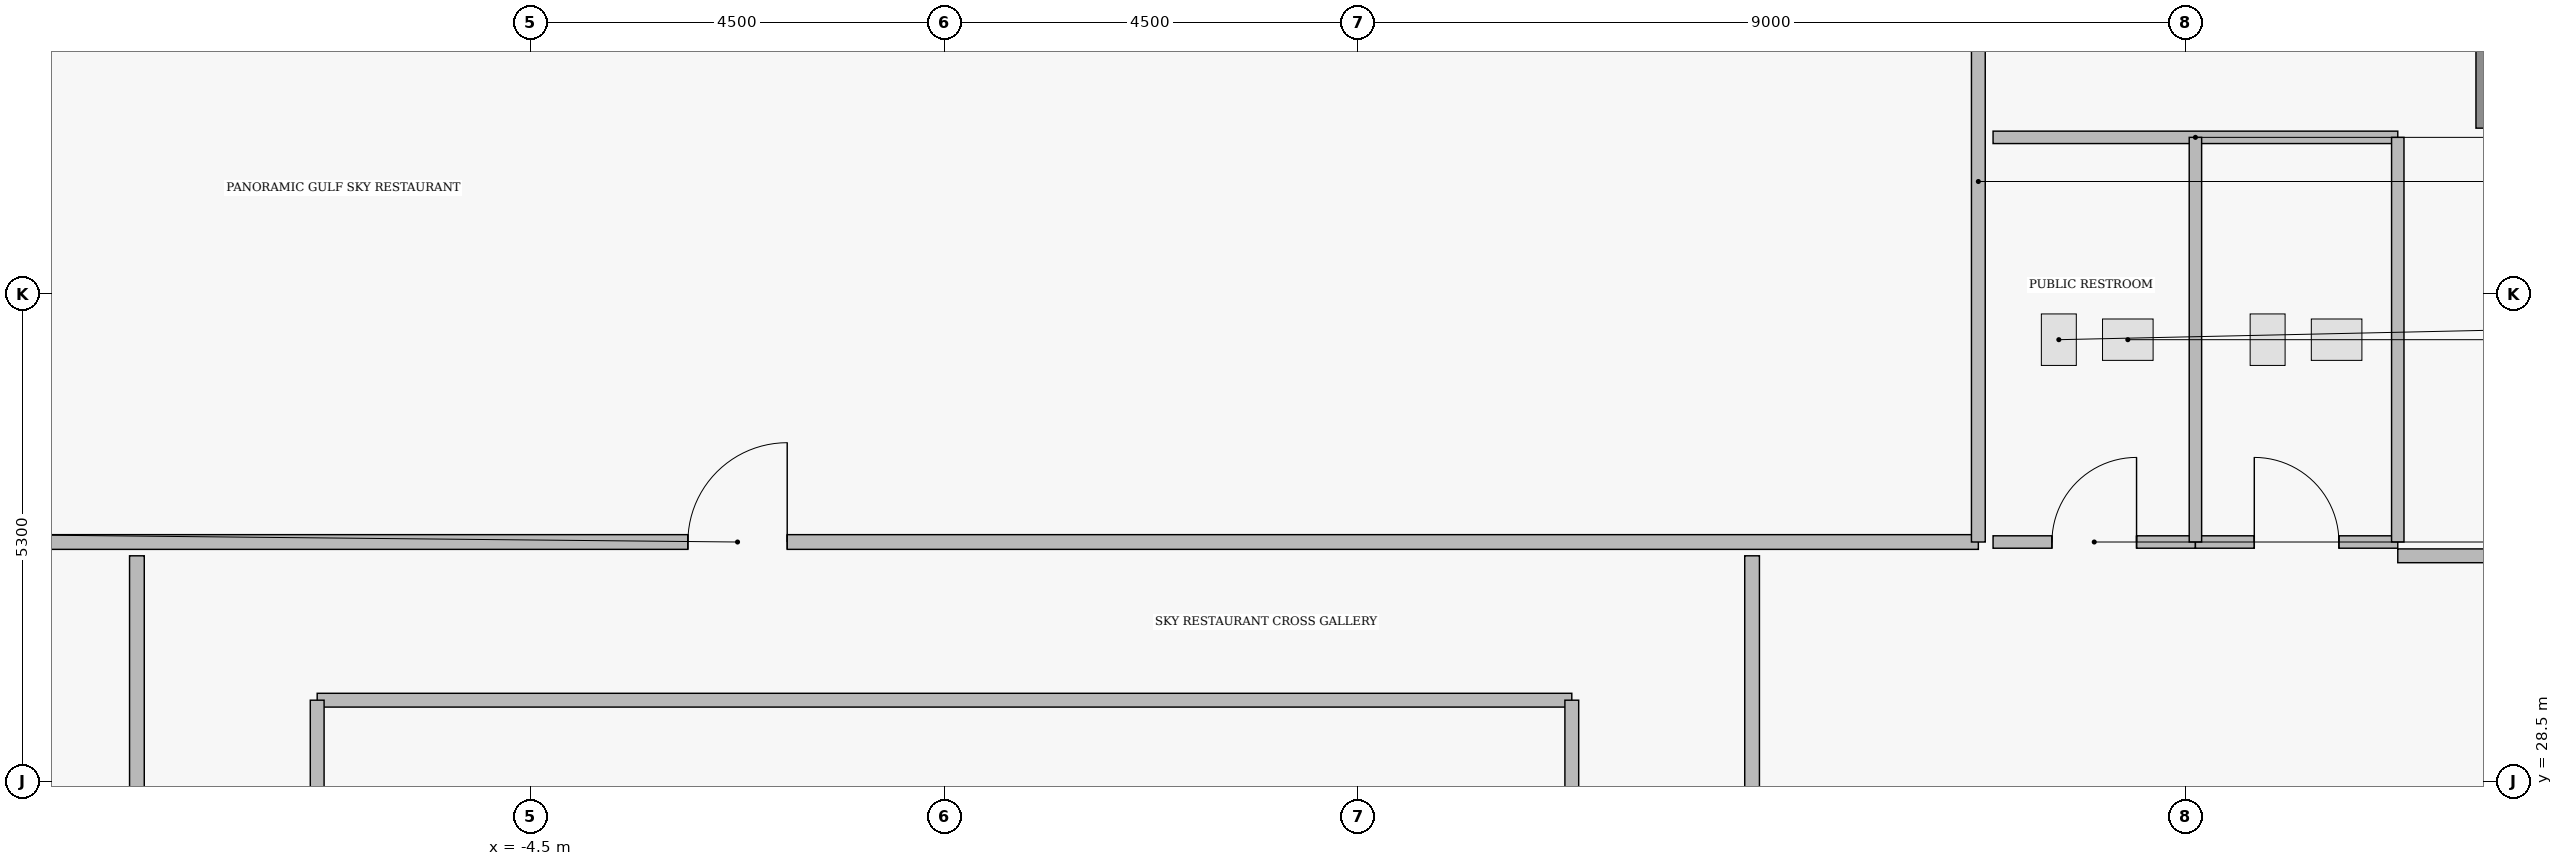
"""IFC4 building model, lengths in metres.
Left out: names, types, materials, properties, quantities, classifications, styles, units other than length and angle.
Written with IfcOpenShell. Run it as: python <this file> out.ifc"""

import sys

from ifc_helpers import new_model, si_unit, direction, frame, frame_2d, origin, place, context, subcontext, project, spatial, rectangle, extrude, element, fill, save


model = new_model("IFC4")
c1 = context("Model", 3, precision=1e-05, world=origin(), true_north=direction((0.0, 1.0)))
c2 = subcontext(c1, "Body", "Model", "MODEL_VIEW")
j1 = project(units=[si_unit("LENGTHUNIT", "METRE"), si_unit("PLANEANGLEUNIT", "RADIAN")], contexts=[c1])
p1 = place(None, origin())
s1 = spatial("IfcSite", under=j1, at=p1, CompositionType="ELEMENT")
p2 = place(p1, origin())
s2 = spatial("IfcBuilding", under=s1, at=p2, CompositionType="ELEMENT")
p3 = place(p2, frame((0.0, 0.0, 284.05)))
s3 = spatial("IfcBuildingStorey", under=s2, at=p3, CompositionType="ELEMENT", Elevation=284.05)
p4 = place(p3, frame((16.8, 39.0, 0.0), z_axis=(0.0, 0.0, 1.0), x_axis=(0.0, -1.0, 0.0)))
e1 = element("IfcWall", 1, at=p4, inside=s3, PredefinedType="STANDARD", context=c2, shape_type="SweptSolid", body=[
    extrude(rectangle(XDim=3.4, YDim=0.3, at=frame_2d((1.7, 0.0))), origin(), (0.0, 0.0, 1.0), 4.18),
])
p5 = place(p4, frame((1.125, 0.0, 1.25)))
e2 = element("IfcOpeningElement", 2, at=p5, cuts=e1, PredefinedType="OPENING", context=c2, shape_type="SweptSolid", body=[
    extrude(rectangle(XDim=1.15, YDim=1.55, at=frame_2d((0.575, 0.775))), frame((0.0, 0.16, 0.0), z_axis=(0.0, -1.0, 0.0), x_axis=(1.0, 0.0, 0.0)), (0.0, 0.0, 1.0), 0.32),
])
p6 = place(p3, frame((-20.14, 31.1, 0.0), z_axis=(0.0, 0.0, 1.0), x_axis=(1.0, 0.0, 0.0)))
e3 = element("IfcWall", 3, at=p6, inside=s3, PredefinedType="PARTITIONING", context=c2, shape_type="SweptSolid", body=[
    extrude(rectangle(XDim=31.38, YDim=0.16, at=frame_2d((15.69, 0.0))), origin(), (0.0, 0.0, 1.0), 4.18),
])
p7 = place(p6, frame((17.35, 0.0, 0.0)))
e4 = element("IfcOpeningElement", 4, at=p7, cuts=e3, PredefinedType="OPENING", context=c2, shape_type="SweptSolid", body=[
    extrude(rectangle(XDim=1.08, YDim=2.18, at=frame_2d((0.54, 1.09))), frame((0.0, 0.09, 0.0), z_axis=(0.0, -1.0, 0.0), x_axis=(1.0, 0.0, 0.0)), (0.0, 0.0, 1.0), 0.18),
])
p8 = place(p3, frame((-8.78, 16.75, 0.0), z_axis=(0.0, 0.0, 1.0), x_axis=(0.0, 1.0, 0.0)))
e5 = element("IfcWall", 5, at=p8, inside=s3, PredefinedType="PARTITIONING", context=c2, shape_type="SweptSolid", body=[
    extrude(rectangle(XDim=14.2, YDim=0.16, at=frame_2d((7.1, 0.0))), origin(), (0.0, 0.0, 1.0), 4.18),
])
p9 = place(p8, frame((6.56, 0.0, 0.0)))
e6 = element("IfcOpeningElement", 6, at=p9, cuts=e5, PredefinedType="OPENING", context=c2, shape_type="SweptSolid", body=[
    extrude(rectangle(XDim=1.08, YDim=2.18, at=frame_2d((0.54, 1.09))), frame((0.0, 0.09, 0.0), z_axis=(0.0, -1.0, 0.0), x_axis=(1.0, 0.0, 0.0)), (0.0, 0.0, 1.0), 0.18),
])
p10 = place(p3, frame((8.78, 16.75, 0.0), z_axis=(0.0, 0.0, 1.0), x_axis=(0.0, 1.0, 0.0)))
e7 = element("IfcWall", 7, at=p10, inside=s3, PredefinedType="PARTITIONING", context=c2, shape_type="SweptSolid", body=[
    extrude(rectangle(XDim=14.2, YDim=0.16, at=frame_2d((7.1, 0.0))), origin(), (0.0, 0.0, 1.0), 4.18),
])
p11 = place(p10, frame((6.56, 0.0, 0.0)))
e8 = element("IfcOpeningElement", 8, at=p11, cuts=e7, PredefinedType="OPENING", context=c2, shape_type="SweptSolid", body=[
    extrude(rectangle(XDim=1.08, YDim=2.18, at=frame_2d((0.54, 1.09))), frame((0.0, 0.09, 0.0), z_axis=(0.0, -1.0, 0.0), x_axis=(1.0, 0.0, 0.0)), (0.0, 0.0, 1.0), 0.18),
])
p12 = place(p3, frame((11.4, 31.1, 0.0), z_axis=(0.0, 0.0, 1.0), x_axis=(1.0, 0.0, 0.0)))
e9 = element("IfcWall", 9, at=p12, inside=s3, PredefinedType="PLUMBINGWALL", context=c2, shape_type="SweptSolid", body=[
    extrude(rectangle(XDim=2.2, YDim=0.135, at=frame_2d((1.1, 0.0))), origin(), (0.0, 0.0, 1.0), 4.18),
])
p13 = place(p12, frame((0.64, 0.0, 0.0)))
e10 = element("IfcOpeningElement", 10, at=p13, cuts=e9, PredefinedType="OPENING", context=c2, shape_type="SweptSolid", body=[
    extrude(rectangle(XDim=0.92, YDim=2.12, at=frame_2d((0.46, 1.06))), frame((0.0, 0.077, 0.0), z_axis=(0.0, -1.0, 0.0), x_axis=(1.0, 0.0, 0.0)), (0.0, 0.0, 1.0), 0.155),
])
p14 = place(p3, frame((13.6, 31.1, 0.0), z_axis=(0.0, 0.0, 1.0), x_axis=(1.0, 0.0, 0.0)))
e11 = element("IfcWall", 11, at=p14, inside=s3, PredefinedType="PLUMBINGWALL", context=c2, shape_type="SweptSolid", body=[
    extrude(rectangle(XDim=2.2, YDim=0.135, at=frame_2d((1.1, 0.0))), origin(), (0.0, 0.0, 1.0), 4.18),
])
p15 = place(p14, frame((0.64, 0.0, 0.0)))
e12 = element("IfcOpeningElement", 12, at=p15, cuts=e11, PredefinedType="OPENING", context=c2, shape_type="SweptSolid", body=[
    extrude(rectangle(XDim=0.92, YDim=2.12, at=frame_2d((0.46, 1.06))), frame((0.0, 0.077, 0.0), z_axis=(0.0, -1.0, 0.0), x_axis=(1.0, 0.0, 0.0)), (0.0, 0.0, 1.0), 0.155),
])
p16 = place(p3, frame((11.24, 31.1, 0.0), z_axis=(0.0, 0.0, 1.0), x_axis=(0.0, 1.0, 0.0)))
e13 = element("IfcWall", 13, at=p16, inside=s3, PredefinedType="PARTITIONING", context=c2, shape_type="SweptSolid", body=[
    extrude(rectangle(XDim=7.84, YDim=0.15, at=frame_2d((3.92, 0.0))), origin(), (0.0, 0.0, 1.0), 4.18),
])
p17 = place(p3, frame((-6.82, 29.38, 0.0), z_axis=(0.0, 0.0, 1.0), x_axis=(1.0, 0.0, 0.0)))
e14 = element("IfcWall", 14, at=p17, inside=s3, PredefinedType="PARTITIONING", context=c2, shape_type="SweptSolid", body=[
    extrude(rectangle(XDim=13.64, YDim=0.15, at=frame_2d((6.82, 0.0))), origin(), (0.0, 0.0, 1.0), 4.18),
])
for number, where, z_axis, x_axis in (
    (15, (-6.82, 16.75, 0.0), (0.0, 0.0, 1.0), (0.0, 1.0, 0.0)),
    (16, (6.82, 16.75, 0.0), (0.0, 0.0, 1.0), (0.0, 1.0, 0.0)),
):
    element("IfcWall", number, at=place(p3, frame(where, z_axis=z_axis, x_axis=x_axis)), inside=s3, PredefinedType="PARTITIONING", context=c2, shape_type="SweptSolid", body=[
        extrude(rectangle(XDim=12.63, YDim=0.15, at=frame_2d((6.315, 0.0))), origin(), (0.0, 0.0, 1.0), 4.18),
    ])
p18 = place(p3, frame((15.8, 30.95, 0.0), z_axis=(0.0, 0.0, 1.0), x_axis=(1.0, 0.0, 0.0)))
e17 = element("IfcWall", 17, at=p18, inside=s3, PredefinedType="PARTITIONING", context=c2, shape_type="SweptSolid", body=[
    extrude(rectangle(XDim=4.34, YDim=0.15, at=frame_2d((2.17, 0.0))), origin(), (0.0, 0.0, 1.0), 4.18),
])
p19 = place(p3, frame((11.4, 35.5, 0.0), z_axis=(0.0, 0.0, 1.0), x_axis=(1.0, 0.0, 0.0)))
e18 = element("IfcWall", 18, at=p19, inside=s3, PredefinedType="PLUMBINGWALL", context=c2, shape_type="SweptSolid", body=[
    extrude(rectangle(XDim=4.4, YDim=0.135, at=frame_2d((2.2, 0.0))), origin(), (0.0, 0.0, 1.0), 3.776),
])
p20 = place(p3, frame((15.8, 31.1, 0.0), z_axis=(0.0, 0.0, 1.0), x_axis=(0.0, 1.0, 0.0)))
e19 = element("IfcWall", 19, at=p20, inside=s3, PredefinedType="PLUMBINGWALL", context=c2, shape_type="SweptSolid", body=[
    extrude(rectangle(XDim=4.4, YDim=0.135, at=frame_2d((2.2, 0.0))), origin(), (0.0, 0.0, 1.0), 4.18),
])
p21 = place(p3, frame((13.6, 31.1, 0.0), z_axis=(0.0, 0.0, 1.0), x_axis=(0.0, 1.0, 0.0)))
e20 = element("IfcWall", 20, at=p21, inside=s3, PredefinedType="PLUMBINGWALL", context=c2, shape_type="SweptSolid", body=[
    extrude(rectangle(XDim=4.4, YDim=0.135, at=frame_2d((2.2, 0.0))), origin(), (0.0, 0.0, 1.0), 3.062),
])
p22 = place(p7, origin())
e21 = element("IfcDoor", 21, at=p22, inside=s3, OperationType="SINGLE_SWING_RIGHT", PredefinedType="DOOR", context=c2, shape_type="SweptSolid", body=[
    extrude(rectangle(XDim=1.08, YDim=2.18, at=frame_2d((0.54, 1.09))), frame((0.0, 0.025, 0.0), z_axis=(0.0, -1.0, 0.0), x_axis=(1.0, 0.0, 0.0)), (0.0, 0.0, 1.0), 0.05),
])
fill(e4, e21)
p23 = place(p13, origin())
e22 = element("IfcDoor", 22, at=p23, inside=s3, OperationType="SINGLE_SWING_RIGHT", PredefinedType="DOOR", context=c2, shape_type="SweptSolid", body=[
    extrude(rectangle(XDim=0.92, YDim=2.12, at=frame_2d((0.46, 1.06))), frame((0.0, 0.025, 0.0), z_axis=(0.0, -1.0, 0.0), x_axis=(1.0, 0.0, 0.0)), (0.0, 0.0, 1.0), 0.05),
])
fill(e10, e22)
p24 = place(p15, origin())
e23 = element("IfcDoor", 23, at=p24, inside=s3, OperationType="SINGLE_SWING_LEFT", PredefinedType="DOOR", context=c2, shape_type="SweptSolid", body=[
    extrude(rectangle(XDim=0.92, YDim=2.12, at=frame_2d((0.46, 1.06))), frame((0.0, 0.025, 0.0), z_axis=(0.0, -1.0, 0.0), x_axis=(1.0, 0.0, 0.0)), (0.0, 0.0, 1.0), 0.05),
])
fill(e12, e23)
save(model, sys.argv[1])
